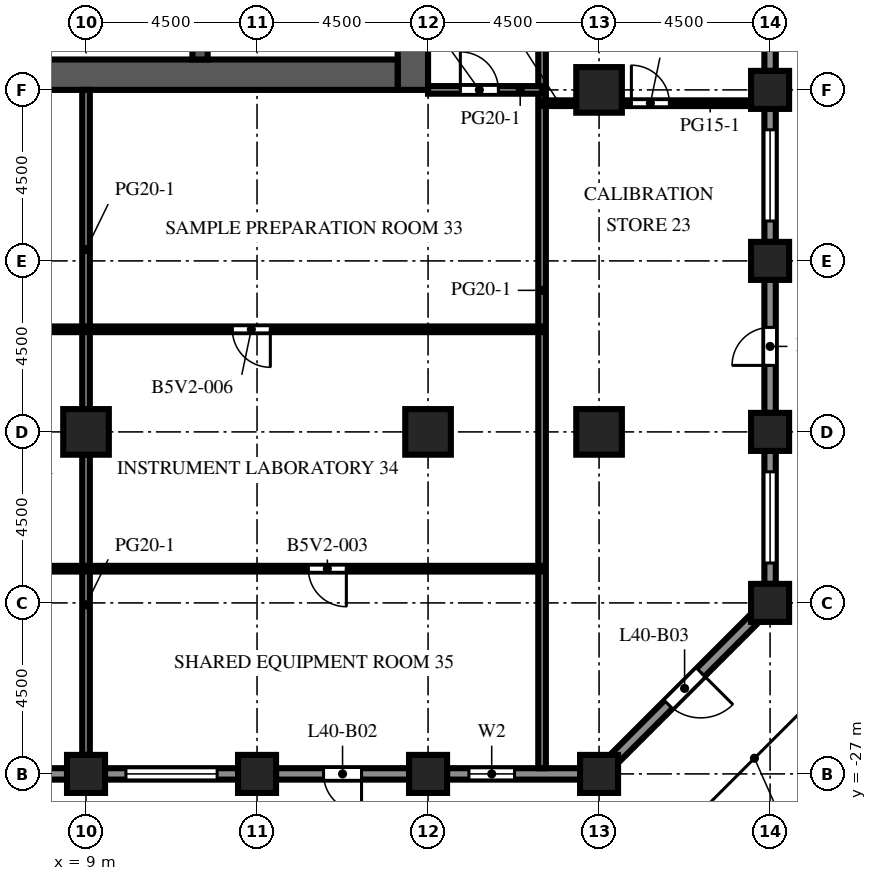
"""IFC4 building model, lengths in metres.
Left out: names, types, materials, properties, quantities, classifications, styles, units other than length and angle.
Written with IfcOpenShell. Run it as: python <this file> out.ifc"""

import sys

from ifc_helpers import new_model, si_unit, direction, frame, frame_2d, origin, origin_2d, place, context, subcontext, project, spatial, rectangle, extrude, element, fill, save


model = new_model("IFC4")
c1 = context("Model", 3, precision=1e-05, world=origin(), true_north=direction((0.0, 1.0)))
c2 = subcontext(c1, "Body", "Model", "MODEL_VIEW")
j1 = project(units=[si_unit("LENGTHUNIT", "METRE"), si_unit("PLANEANGLEUNIT", "RADIAN")], contexts=[c1])
p1 = place(None, origin())
s1 = spatial("IfcSite", under=j1, at=p1, CompositionType="ELEMENT")
p2 = place(p1, origin())
s2 = spatial("IfcBuilding", under=s1, at=p2, CompositionType="ELEMENT")
p3 = place(p2, frame((0.0, 0.0, 177.3)))
s3 = spatial("IfcBuildingStorey", under=s2, at=p3, CompositionType="ELEMENT", Elevation=177.3)
for number, where, z_axis, x_axis in (
    (1, (9.0, -27.0, 0.0), (0.0, 0.0, 1.0), (1.0, 0.0, 0.0)),
    (2, (13.5, -27.0, 0.0), (0.0, 0.0, 1.0), (1.0, 0.0, 0.0)),
    (3, (18.0, -27.0, 0.0), (0.0, 0.0, 1.0), (1.0, 0.0, 0.0)),
    (4, (22.5, -27.0, 0.0), (0.0, 0.0, 1.0), (1.0, 0.0, 0.0)),
    (5, (27.0, -22.5, 0.0), (0.0, 0.0, 1.0), (1.0, 0.0, 0.0)),
    (6, (27.0, -18.0, 0.0), (0.0, 0.0, 1.0), (1.0, 0.0, 0.0)),
    (7, (27.0, -13.5, 0.0), (0.0, 0.0, 1.0), (1.0, 0.0, 0.0)),
    (8, (27.0, -9.0, 0.0), (0.0, 0.0, 1.0), (1.0, 0.0, 0.0)),
):
    element("IfcColumn", number, at=place(p3, frame(where, z_axis=z_axis, x_axis=x_axis)), inside=s3, PredefinedType="COLUMN", context=c2, shape_type="SweptSolid", body=[
        extrude(rectangle(XDim=1.0, YDim=1.0, at=origin_2d()), origin(), (0.0, 0.0, 1.0), 4.1),
    ])
for number, where, z_axis, x_axis in (
    (9, (9.0, -18.0, 0.0), (0.0, 0.0, 1.0), (1.0, 0.0, 0.0)),
    (10, (18.0, -18.0, 0.0), (0.0, 0.0, 1.0), (1.0, 0.0, 0.0)),
    (11, (22.5, -18.0, 0.0), (0.0, 0.0, 1.0), (1.0, 0.0, 0.0)),
    (12, (22.5, -9.0, 0.0), (0.0, 0.0, 1.0), (1.0, 0.0, 0.0)),
):
    element("IfcColumn", number, at=place(p3, frame(where, z_axis=z_axis, x_axis=x_axis)), inside=s3, PredefinedType="COLUMN", context=c2, shape_type="SweptSolid", body=[
        extrude(rectangle(XDim=1.2, YDim=1.2, at=origin_2d()), origin(), (0.0, 0.0, 1.0), 4.1),
    ])
p4 = place(p3, frame((17.6, -9.0, 0.0), z_axis=(0.0, 0.0, 1.0), x_axis=(0.0, 1.0, 0.0)))
e13 = element("IfcWall", 13, at=p4, inside=s3, PredefinedType="SHEAR", context=c2, shape_type="SweptSolid", body=[
    extrude(rectangle(XDim=27.5, YDim=0.8, at=frame_2d((13.75, 0.0))), origin(), (0.0, 0.0, 1.0), 4.1),
])
p5 = place(p4, frame((12.55, 0.0, 0.0)))
e14 = element("IfcOpeningElement", 14, at=p5, cuts=e13, PredefinedType="OPENING", context=c2, shape_type="SweptSolid", body=[
    extrude(rectangle(XDim=2.4, YDim=2.4, at=frame_2d((1.2, 1.2))), frame((0.0, 0.41, 0.0), z_axis=(0.0, -1.0, 0.0), x_axis=(1.0, 0.0, 0.0)), (0.0, 0.0, 1.0), 0.82),
])
p6 = place(p4, frame((6.825, 0.0, 0.0)))
e15 = element("IfcOpeningElement", 15, at=p6, cuts=e13, PredefinedType="OPENING", context=c2, shape_type="SweptSolid", body=[
    extrude(rectangle(XDim=1.2, YDim=2.1, at=frame_2d((0.6, 1.05))), frame((0.0, 0.41, 0.0), z_axis=(0.0, -1.0, 0.0), x_axis=(1.0, 0.0, 0.0)), (0.0, 0.0, 1.0), 0.82),
])
p7 = place(p4, frame((19.475, 0.0, 0.0)))
e16 = element("IfcOpeningElement", 16, at=p7, cuts=e13, PredefinedType="OPENING", context=c2, shape_type="SweptSolid", body=[
    extrude(rectangle(XDim=1.2, YDim=2.1, at=frame_2d((0.6, 1.05))), frame((0.0, 0.41, 0.0), z_axis=(0.0, -1.0, 0.0), x_axis=(1.0, 0.0, 0.0)), (0.0, 0.0, 1.0), 0.82),
])
p8 = place(p3, frame((6.8, -8.6, 0.0), z_axis=(0.0, 0.0, 1.0), x_axis=(1.0, 0.0, 0.0)))
e17 = element("IfcWall", 17, at=p8, inside=s3, PredefinedType="SHEAR", context=c2, shape_type="SweptSolid", body=[
    extrude(rectangle(XDim=10.4, YDim=0.8, at=frame_2d((5.2, 0.0))), origin(), (0.0, 0.0, 1.0), 4.1),
])
p9 = place(p3, frame((12.0, -8.2, 0.0), z_axis=(0.0, 0.0, 1.0), x_axis=(0.0, 1.0, 0.0)))
e18 = element("IfcWall", 18, at=p9, inside=s3, PredefinedType="SHEAR", context=c2, shape_type="SweptSolid", body=[
    extrude(rectangle(XDim=7.5, YDim=0.4, at=frame_2d((3.75, 0.0))), origin(), (0.0, 0.0, 1.0), 4.1),
])
p10 = place(p3, frame((8.5, -27.0, 0.0), z_axis=(0.0, 0.0, 1.0), x_axis=(-1.0, 0.0, 0.0)))
e19 = element("IfcWall", 19, at=p10, inside=s3, PredefinedType="SOLIDWALL", context=c2, shape_type="SweptSolid", body=[
    extrude(rectangle(XDim=3.5, YDim=0.3, at=frame_2d((1.75, 0.0))), origin(), (0.0, 0.0, 1.0), 2.85),
])
p11 = place(p10, frame((0.55, 0.0, 0.8)))
e20 = element("IfcOpeningElement", 20, at=p11, cuts=e19, PredefinedType="OPENING", context=c2, shape_type="SweptSolid", body=[
    extrude(rectangle(XDim=2.4, YDim=1.7, at=frame_2d((1.2, 0.85))), frame((0.0, 0.16, 0.0), z_axis=(0.0, -1.0, 0.0), x_axis=(1.0, 0.0, 0.0)), (0.0, 0.0, 1.0), 0.32),
])
p12 = place(p3, frame((13.0, -27.0, 0.0), z_axis=(0.0, 0.0, 1.0), x_axis=(-1.0, 0.0, 0.0)))
e21 = element("IfcWall", 21, at=p12, inside=s3, PredefinedType="SOLIDWALL", context=c2, shape_type="SweptSolid", body=[
    extrude(rectangle(XDim=3.5, YDim=0.3, at=frame_2d((1.75, 0.0))), origin(), (0.0, 0.0, 1.0), 2.85),
])
p13 = place(p12, frame((0.55, 0.0, 0.8)))
e22 = element("IfcOpeningElement", 22, at=p13, cuts=e21, PredefinedType="OPENING", context=c2, shape_type="SweptSolid", body=[
    extrude(rectangle(XDim=2.4, YDim=1.7, at=frame_2d((1.2, 0.85))), frame((0.0, 0.16, 0.0), z_axis=(0.0, -1.0, 0.0), x_axis=(1.0, 0.0, 0.0)), (0.0, 0.0, 1.0), 0.32),
])
p14 = place(p3, frame((17.5, -27.0, 0.0), z_axis=(0.0, 0.0, 1.0), x_axis=(-1.0, 0.0, 0.0)))
e23 = element("IfcWall", 23, at=p14, inside=s3, PredefinedType="SOLIDWALL", context=c2, shape_type="SweptSolid", body=[
    extrude(rectangle(XDim=3.5, YDim=0.3, at=frame_2d((1.75, 0.0))), origin(), (0.0, 0.0, 1.0), 2.85),
])
p15 = place(p14, frame((1.25, 0.0, 0.0)))
e24 = element("IfcOpeningElement", 24, at=p15, cuts=e23, PredefinedType="OPENING", context=c2, shape_type="SweptSolid", body=[
    extrude(rectangle(XDim=1.0, YDim=2.2, at=frame_2d((0.5, 1.1))), frame((0.0, 0.16, 0.0), z_axis=(0.0, -1.0, 0.0), x_axis=(1.0, 0.0, 0.0)), (0.0, 0.0, 1.0), 0.32),
])
p16 = place(p3, frame((22.0, -27.0, 0.0), z_axis=(0.0, 0.0, 1.0), x_axis=(-1.0, 0.0, 0.0)))
e25 = element("IfcWall", 25, at=p16, inside=s3, PredefinedType="SOLIDWALL", context=c2, shape_type="SweptSolid", body=[
    extrude(rectangle(XDim=3.5, YDim=0.3, at=frame_2d((1.75, 0.0))), origin(), (0.0, 0.0, 1.0), 2.85),
])
p17 = place(p16, frame((1.725, 0.0, 0.8)))
e26 = element("IfcOpeningElement", 26, at=p17, cuts=e25, PredefinedType="OPENING", context=c2, shape_type="SweptSolid", body=[
    extrude(rectangle(XDim=1.2, YDim=1.7, at=frame_2d((0.6, 0.85))), frame((0.0, 0.16, 0.0), z_axis=(0.0, -1.0, 0.0), x_axis=(1.0, 0.0, 0.0)), (0.0, 0.0, 1.0), 0.32),
])
p18 = place(p3, frame((26.606, -22.894, 0.0), z_axis=(0.0, 0.0, 1.0), x_axis=(-0.707106781187, -0.707106781187, 0.0)))
e27 = element("IfcWall", 27, at=p18, inside=s3, PredefinedType="SOLIDWALL", context=c2, shape_type="SweptSolid", body=[
    extrude(rectangle(XDim=5.25, YDim=0.3, at=frame_2d((2.625, 0.0))), origin(), (0.0, 0.0, 1.0), 2.85),
])
p19 = place(p18, frame((2.025, 0.0, 0.0)))
e28 = element("IfcOpeningElement", 28, at=p19, cuts=e27, PredefinedType="OPENING", context=c2, shape_type="SweptSolid", body=[
    extrude(rectangle(XDim=1.2, YDim=2.2, at=frame_2d((0.6, 1.1))), frame((0.0, 0.16, 0.0), z_axis=(0.0, -1.0, 0.0), x_axis=(1.0, 0.0, 0.0)), (0.0, 0.0, 1.0), 0.32),
])
p20 = place(p3, frame((27.0, -18.5, 0.0), z_axis=(0.0, 0.0, 1.0), x_axis=(0.0, -1.0, 0.0)))
e29 = element("IfcWall", 29, at=p20, inside=s3, PredefinedType="SOLIDWALL", context=c2, shape_type="SweptSolid", body=[
    extrude(rectangle(XDim=3.5, YDim=0.3, at=frame_2d((1.75, 0.0))), origin(), (0.0, 0.0, 1.0), 2.85),
])
p21 = place(p20, frame((0.55, 0.0, 0.8)))
e30 = element("IfcOpeningElement", 30, at=p21, cuts=e29, PredefinedType="OPENING", context=c2, shape_type="SweptSolid", body=[
    extrude(rectangle(XDim=2.4, YDim=1.7, at=frame_2d((1.2, 0.85))), frame((0.0, 0.16, 0.0), z_axis=(0.0, -1.0, 0.0), x_axis=(1.0, 0.0, 0.0)), (0.0, 0.0, 1.0), 0.32),
])
p22 = place(p3, frame((27.0, -14.0, 0.0), z_axis=(0.0, 0.0, 1.0), x_axis=(0.0, -1.0, 0.0)))
e31 = element("IfcWall", 31, at=p22, inside=s3, PredefinedType="SOLIDWALL", context=c2, shape_type="SweptSolid", body=[
    extrude(rectangle(XDim=3.5, YDim=0.3, at=frame_2d((1.75, 0.0))), origin(), (0.0, 0.0, 1.0), 2.85),
])
p23 = place(p22, frame((1.25, 0.0, 0.0)))
e32 = element("IfcOpeningElement", 32, at=p23, cuts=e31, PredefinedType="OPENING", context=c2, shape_type="SweptSolid", body=[
    extrude(rectangle(XDim=1.0, YDim=2.2, at=frame_2d((0.5, 1.1))), frame((0.0, 0.16, 0.0), z_axis=(0.0, -1.0, 0.0), x_axis=(1.0, 0.0, 0.0)), (0.0, 0.0, 1.0), 0.32),
])
p24 = place(p3, frame((27.0, -9.5, 0.0), z_axis=(0.0, 0.0, 1.0), x_axis=(0.0, -1.0, 0.0)))
e33 = element("IfcWall", 33, at=p24, inside=s3, PredefinedType="SOLIDWALL", context=c2, shape_type="SweptSolid", body=[
    extrude(rectangle(XDim=3.5, YDim=0.3, at=frame_2d((1.75, 0.0))), origin(), (0.0, 0.0, 1.0), 2.85),
])
p25 = place(p24, frame((0.55, 0.0, 0.8)))
e34 = element("IfcOpeningElement", 34, at=p25, cuts=e33, PredefinedType="OPENING", context=c2, shape_type="SweptSolid", body=[
    extrude(rectangle(XDim=2.4, YDim=1.7, at=frame_2d((1.2, 0.85))), frame((0.0, 0.16, 0.0), z_axis=(0.0, -1.0, 0.0), x_axis=(1.0, 0.0, 0.0)), (0.0, 0.0, 1.0), 0.32),
])
p26 = place(p3, frame((27.0, -5.0, 0.0), z_axis=(0.0, 0.0, 1.0), x_axis=(0.0, -1.0, 0.0)))
e35 = element("IfcWall", 35, at=p26, inside=s3, PredefinedType="SOLIDWALL", context=c2, shape_type="SweptSolid", body=[
    extrude(rectangle(XDim=3.5, YDim=0.3, at=frame_2d((1.75, 0.0))), origin(), (0.0, 0.0, 1.0), 2.85),
])
p27 = place(p26, frame((0.55, 0.0, 0.8)))
e36 = element("IfcOpeningElement", 36, at=p27, cuts=e35, PredefinedType="OPENING", context=c2, shape_type="SweptSolid", body=[
    extrude(rectangle(XDim=2.4, YDim=1.7, at=frame_2d((1.2, 0.85))), frame((0.0, 0.16, 0.0), z_axis=(0.0, -1.0, 0.0), x_axis=(1.0, 0.0, 0.0)), (0.0, 0.0, 1.0), 0.32),
])
p28 = place(p3, frame((9.0, -26.5, 0.0), z_axis=(0.0, 0.0, 1.0), x_axis=(0.0, 1.0, 0.0)))
e37 = element("IfcWall", 37, at=p28, inside=s3, PredefinedType="PARTITIONING", context=c2, shape_type="SweptSolid", body=[
    extrude(rectangle(XDim=7.9, YDim=0.2, at=frame_2d((3.95, 0.0))), origin(), (0.0, 0.0, 1.0), 3.65),
])
p29 = place(p3, frame((9.0, -17.4, 0.0), z_axis=(0.0, 0.0, 1.0), x_axis=(0.0, 1.0, 0.0)))
e38 = element("IfcWall", 38, at=p29, inside=s3, PredefinedType="PARTITIONING", context=c2, shape_type="SweptSolid", body=[
    extrude(rectangle(XDim=8.4, YDim=0.2, at=frame_2d((4.2, 0.0))), origin(), (0.0, 0.0, 1.0), 3.65),
])
p30 = place(p3, frame((21.0, 3.25, 0.0), z_axis=(0.0, 0.0, 1.0), x_axis=(0.0, -1.0, 0.0)))
e39 = element("IfcWall", 39, at=p30, inside=s3, PredefinedType="PARTITIONING", context=c2, shape_type="SweptSolid", body=[
    extrude(rectangle(XDim=30.1, YDim=0.2, at=frame_2d((15.05, 0.0))), origin(), (0.0, 0.0, 1.0), 3.65),
])
p31 = place(p30, frame((3.95, 0.0, 0.0)))
e40 = element("IfcOpeningElement", 40, at=p31, cuts=e39, PredefinedType="OPENING", context=c2, shape_type="SweptSolid", body=[
    extrude(rectangle(XDim=1.0, YDim=2.1, at=frame_2d((0.5, 1.05))), frame((0.0, 0.11, 0.0), z_axis=(0.0, -1.0, 0.0), x_axis=(1.0, 0.0, 0.0)), (0.0, 0.0, 1.0), 0.22),
])
p32 = place(p3, frame((21.0, -21.6, 0.0), z_axis=(0.0, 0.0, 1.0), x_axis=(-1.0, 0.0, 0.0)))
e41 = element("IfcWall", 41, at=p32, inside=s3, PredefinedType="PARTITIONING", context=c2, shape_type="SweptSolid", body=[
    extrude(rectangle(XDim=34.5, YDim=0.15, at=frame_2d((17.25, 0.0))), origin(), (0.0, 0.0, 1.0), 3.65),
])
p33 = place(p32, frame((28.65, 0.0, 0.0)))
e42 = element("IfcOpeningElement", 42, at=p33, cuts=e41, PredefinedType="OPENING", context=c2, shape_type="SweptSolid", body=[
    extrude(rectangle(XDim=1.0, YDim=2.1, at=frame_2d((0.5, 1.05))), frame((0.0, 0.085, 0.0), z_axis=(0.0, -1.0, 0.0), x_axis=(1.0, 0.0, 0.0)), (0.0, 0.0, 1.0), 0.17),
])
p34 = place(p32, frame((16.4, 0.0, 0.0)))
e43 = element("IfcOpeningElement", 43, at=p34, cuts=e41, PredefinedType="OPENING", context=c2, shape_type="SweptSolid", body=[
    extrude(rectangle(XDim=1.0, YDim=2.1, at=frame_2d((0.5, 1.05))), frame((0.0, 0.085, 0.0), z_axis=(0.0, -1.0, 0.0), x_axis=(1.0, 0.0, 0.0)), (0.0, 0.0, 1.0), 0.17),
])
p35 = place(p32, frame((5.15, 0.0, 0.0)))
e44 = element("IfcOpeningElement", 44, at=p35, cuts=e41, PredefinedType="OPENING", context=c2, shape_type="SweptSolid", body=[
    extrude(rectangle(XDim=1.0, YDim=2.1, at=frame_2d((0.5, 1.05))), frame((0.0, 0.085, 0.0), z_axis=(0.0, -1.0, 0.0), x_axis=(1.0, 0.0, 0.0)), (0.0, 0.0, 1.0), 0.17),
])
p36 = place(p3, frame((21.0, -15.3, 0.0), z_axis=(0.0, 0.0, 1.0), x_axis=(-1.0, 0.0, 0.0)))
e45 = element("IfcWall", 45, at=p36, inside=s3, PredefinedType="PARTITIONING", context=c2, shape_type="SweptSolid", body=[
    extrude(rectangle(XDim=34.5, YDim=0.15, at=frame_2d((17.25, 0.0))), origin(), (0.0, 0.0, 1.0), 3.65),
])
p37 = place(p36, frame((28.9, 0.0, 0.0)))
e46 = element("IfcOpeningElement", 46, at=p37, cuts=e45, PredefinedType="OPENING", context=c2, shape_type="SweptSolid", body=[
    extrude(rectangle(XDim=1.0, YDim=2.1, at=frame_2d((0.5, 1.05))), frame((0.0, 0.085, 0.0), z_axis=(0.0, -1.0, 0.0), x_axis=(1.0, 0.0, 0.0)), (0.0, 0.0, 1.0), 0.17),
])
p38 = place(p36, frame((17.15, 0.0, 0.0)))
e47 = element("IfcOpeningElement", 47, at=p38, cuts=e45, PredefinedType="OPENING", context=c2, shape_type="SweptSolid", body=[
    extrude(rectangle(XDim=1.0, YDim=2.1, at=frame_2d((0.5, 1.05))), frame((0.0, 0.085, 0.0), z_axis=(0.0, -1.0, 0.0), x_axis=(1.0, 0.0, 0.0)), (0.0, 0.0, 1.0), 0.17),
])
p39 = place(p36, frame((7.15, 0.0, 0.0)))
e48 = element("IfcOpeningElement", 48, at=p39, cuts=e45, PredefinedType="OPENING", context=c2, shape_type="SweptSolid", body=[
    extrude(rectangle(XDim=1.0, YDim=2.1, at=frame_2d((0.5, 1.05))), frame((0.0, 0.085, 0.0), z_axis=(0.0, -1.0, 0.0), x_axis=(1.0, 0.0, 0.0)), (0.0, 0.0, 1.0), 0.17),
])
p40 = place(p3, frame((21.0, -9.35, 0.0), z_axis=(0.0, 0.0, 1.0), x_axis=(1.0, 0.0, 0.0)))
e49 = element("IfcWall", 49, at=p40, inside=s3, PredefinedType="PARTITIONING", context=c2, shape_type="SweptSolid", body=[
    extrude(rectangle(XDim=0.9, YDim=0.15, at=frame_2d((0.45, 0.0))), origin(), (0.0, 0.0, 1.0), 3.65),
])
p41 = place(p3, frame((26.5, -9.35, 0.0), z_axis=(0.0, 0.0, 1.0), x_axis=(-1.0, 0.0, 0.0)))
e50 = element("IfcWall", 50, at=p41, inside=s3, PredefinedType="PARTITIONING", context=c2, shape_type="SweptSolid", body=[
    extrude(rectangle(XDim=3.4, YDim=0.15, at=frame_2d((1.7, 0.0))), origin(), (0.0, 0.0, 1.0), 3.65),
])
p42 = place(p41, frame((2.15, 0.0, 0.0)))
e51 = element("IfcOpeningElement", 51, at=p42, cuts=e50, PredefinedType="OPENING", context=c2, shape_type="SweptSolid", body=[
    extrude(rectangle(XDim=1.0, YDim=2.1, at=frame_2d((0.5, 1.05))), frame((0.0, 0.085, 0.0), z_axis=(0.0, -1.0, 0.0), x_axis=(1.0, 0.0, 0.0)), (0.0, 0.0, 1.0), 0.17),
])
p43 = place(p3, frame((21.0, -9.0, 0.0), z_axis=(0.0, 0.0, 1.0), x_axis=(-1.0, 0.0, 0.0)))
e52 = element("IfcWall", 52, at=p43, inside=s3, PredefinedType="PARTITIONING", context=c2, shape_type="SweptSolid", body=[
    extrude(rectangle(XDim=3.0, YDim=0.2, at=frame_2d((1.5, 0.0))), origin(), (0.0, 0.0, 1.0), 3.65),
])
p44 = place(p43, frame((1.15, 0.0, 0.0)))
e53 = element("IfcOpeningElement", 53, at=p44, cuts=e52, PredefinedType="OPENING", context=c2, shape_type="SweptSolid", body=[
    extrude(rectangle(XDim=1.0, YDim=2.1, at=frame_2d((0.5, 1.05))), frame((0.0, 0.11, 0.0), z_axis=(0.0, -1.0, 0.0), x_axis=(1.0, 0.0, 0.0)), (0.0, 0.0, 1.0), 0.22),
])
p45 = place(p13, origin())
e54 = element("IfcWindow", 54, at=p45, inside=s3, PartitioningType="SINGLE_PANEL", PredefinedType="WINDOW", context=c2, shape_type="SweptSolid", body=[
    extrude(rectangle(XDim=2.4, YDim=1.7, at=frame_2d((1.2, 0.85))), frame((0.0, 0.03, 0.0), z_axis=(0.0, -1.0, 0.0), x_axis=(1.0, 0.0, 0.0)), (0.0, 0.0, 1.0), 0.06),
])
fill(e22, e54)
p46 = place(p15, origin())
e55 = element("IfcDoor", 55, at=p46, inside=s3, OperationType="SINGLE_SWING_LEFT", PredefinedType="DOOR", context=c2, shape_type="SweptSolid", body=[
    extrude(rectangle(XDim=1.0, YDim=2.2, at=frame_2d((0.5, 1.1))), frame((0.0, 0.025, 0.0), z_axis=(0.0, -1.0, 0.0), x_axis=(1.0, 0.0, 0.0)), (0.0, 0.0, 1.0), 0.05),
])
fill(e24, e55)
p47 = place(p17, origin())
e56 = element("IfcWindow", 56, at=p47, inside=s3, PartitioningType="SINGLE_PANEL", PredefinedType="WINDOW", context=c2, shape_type="SweptSolid", body=[
    extrude(rectangle(XDim=1.2, YDim=1.7, at=frame_2d((0.6, 0.85))), frame((0.0, 0.03, 0.0), z_axis=(0.0, -1.0, 0.0), x_axis=(1.0, 0.0, 0.0)), (0.0, 0.0, 1.0), 0.06),
])
fill(e26, e56)
p48 = place(p19, origin())
e57 = element("IfcDoor", 57, at=p48, inside=s3, OperationType="SINGLE_SWING_LEFT", PredefinedType="DOOR", context=c2, shape_type="SweptSolid", body=[
    extrude(rectangle(XDim=1.2, YDim=2.2, at=frame_2d((0.6, 1.1))), frame((0.0, 0.025, 0.0), z_axis=(0.0, -1.0, 0.0), x_axis=(1.0, 0.0, 0.0)), (0.0, 0.0, 1.0), 0.05),
])
fill(e28, e57)
p49 = place(p21, origin())
e58 = element("IfcWindow", 58, at=p49, inside=s3, PartitioningType="SINGLE_PANEL", PredefinedType="WINDOW", context=c2, shape_type="SweptSolid", body=[
    extrude(rectangle(XDim=2.4, YDim=1.7, at=frame_2d((1.2, 0.85))), frame((0.0, 0.03, 0.0), z_axis=(0.0, -1.0, 0.0), x_axis=(1.0, 0.0, 0.0)), (0.0, 0.0, 1.0), 0.06),
])
fill(e30, e58)
p50 = place(p23, origin())
e59 = element("IfcDoor", 59, at=p50, inside=s3, OperationType="SINGLE_SWING_RIGHT", PredefinedType="DOOR", context=c2, shape_type="SweptSolid", body=[
    extrude(rectangle(XDim=1.0, YDim=2.2, at=frame_2d((0.5, 1.1))), frame((0.0, 0.025, 0.0), z_axis=(0.0, -1.0, 0.0), x_axis=(1.0, 0.0, 0.0)), (0.0, 0.0, 1.0), 0.05),
])
fill(e32, e59)
p51 = place(p25, origin())
e60 = element("IfcWindow", 60, at=p51, inside=s3, PartitioningType="SINGLE_PANEL", PredefinedType="WINDOW", context=c2, shape_type="SweptSolid", body=[
    extrude(rectangle(XDim=2.4, YDim=1.7, at=frame_2d((1.2, 0.85))), frame((0.0, 0.03, 0.0), z_axis=(0.0, -1.0, 0.0), x_axis=(1.0, 0.0, 0.0)), (0.0, 0.0, 1.0), 0.06),
])
fill(e34, e60)
p52 = place(p35, origin())
e61 = element("IfcDoor", 61, at=p52, inside=s3, OperationType="SINGLE_SWING_LEFT", PredefinedType="DOOR", context=c2, shape_type="SweptSolid", body=[
    extrude(rectangle(XDim=1.0, YDim=2.1, at=frame_2d((0.5, 1.05))), frame((0.0, 0.025, 0.0), z_axis=(0.0, -1.0, 0.0), x_axis=(1.0, 0.0, 0.0)), (0.0, 0.0, 1.0), 0.05),
])
fill(e44, e61)
p53 = place(p39, origin())
e62 = element("IfcDoor", 62, at=p53, inside=s3, OperationType="SINGLE_SWING_LEFT", PredefinedType="DOOR", context=c2, shape_type="SweptSolid", body=[
    extrude(rectangle(XDim=1.0, YDim=2.1, at=frame_2d((0.5, 1.05))), frame((0.0, 0.025, 0.0), z_axis=(0.0, -1.0, 0.0), x_axis=(1.0, 0.0, 0.0)), (0.0, 0.0, 1.0), 0.05),
])
fill(e48, e62)
p54 = place(p42, origin())
e63 = element("IfcDoor", 63, at=p54, inside=s3, OperationType="SINGLE_SWING_RIGHT", PredefinedType="DOOR", context=c2, shape_type="SweptSolid", body=[
    extrude(rectangle(XDim=1.0, YDim=2.1, at=frame_2d((0.5, 1.05))), frame((0.0, 0.025, 0.0), z_axis=(0.0, -1.0, 0.0), x_axis=(1.0, 0.0, 0.0)), (0.0, 0.0, 1.0), 0.05),
])
fill(e51, e63)
p55 = place(p44, origin())
e64 = element("IfcDoor", 64, at=p55, inside=s3, OperationType="SINGLE_SWING_RIGHT", PredefinedType="DOOR", context=c2, shape_type="SweptSolid", body=[
    extrude(rectangle(XDim=1.0, YDim=2.1, at=frame_2d((0.5, 1.05))), frame((0.0, 0.025, 0.0), z_axis=(0.0, -1.0, 0.0), x_axis=(1.0, 0.0, 0.0)), (0.0, 0.0, 1.0), 0.05),
])
fill(e53, e64)
save(model, sys.argv[1])
